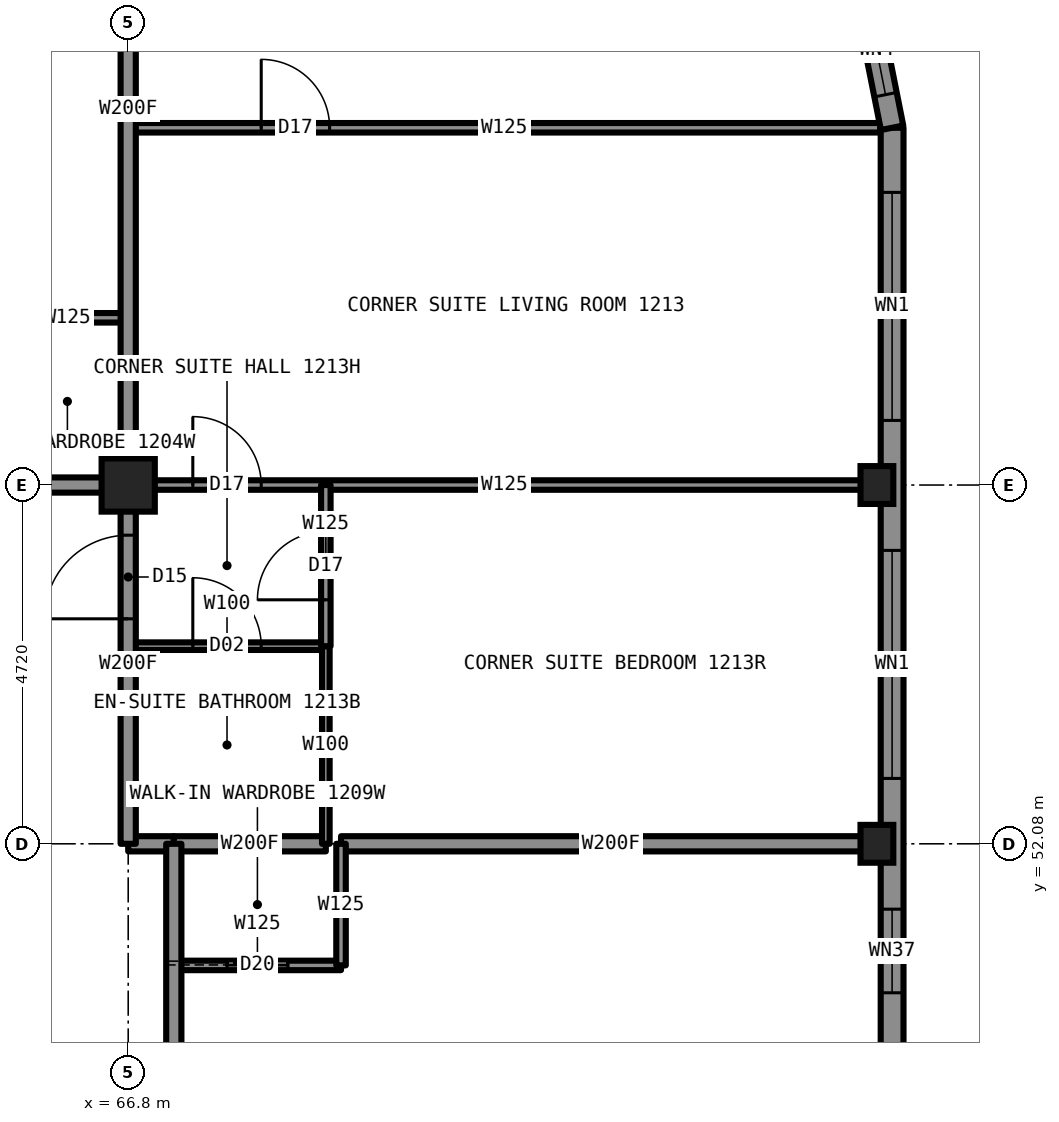
"""IFC4 building model, lengths in metres.
Left out: names, types, materials, properties, quantities, classifications, styles, units other than length and angle.
Written with IfcOpenShell. Run it as: python <this file> out.ifc"""

import sys

from ifc_helpers import new_model, si_unit, direction, frame, frame_2d, origin, origin_2d, place, context, subcontext, project, spatial, rectangle, hollow_rectangle, i_section, extrude, element, fill, save


model = new_model("IFC4")
c1 = context("Model", 3, precision=1e-05, world=origin(), true_north=direction((0.0, 1.0)))
c2 = subcontext(c1, "Body", "Model", "MODEL_VIEW")
j1 = project(units=[si_unit("LENGTHUNIT", "METRE"), si_unit("PLANEANGLEUNIT", "RADIAN")], contexts=[c1])
p1 = place(None, origin())
s1 = spatial("IfcSite", under=j1, at=p1, CompositionType="ELEMENT")
p2 = place(p1, origin())
s2 = spatial("IfcBuilding", under=s1, at=p2, CompositionType="ELEMENT")
p3 = place(p2, frame((0.0, 0.0, 49.5)))
s3 = spatial("IfcBuildingStorey", under=s2, at=p3, CompositionType="ELEMENT", Elevation=49.5)
for number, where, z_axis, x_axis in (
    (1, (76.65, 52.08, 0.0), (0.0, 0.0, 1.0), (1.0, 0.0, 0.0)),
    (2, (76.65, 56.8, 0.0), (0.0, 0.0, 1.0), (1.0, 0.0, 0.0)),
):
    element("IfcColumn", number, at=place(p3, frame(where, z_axis=z_axis, x_axis=x_axis)), inside=s3, PredefinedType="COLUMN", context=c2, shape_type="SweptSolid", body=[
        extrude(i_section(OverallWidth=0.432, OverallDepth=0.498, WebThickness=0.056, FlangeThickness=0.089, at=origin_2d()), origin(), (0.0, 0.0, 1.0), 3.5),
    ])
p4 = place(p3, frame((66.8, 56.8, 0.0), z_axis=(0.0, 0.0, 1.0), x_axis=(1.0, 0.0, 0.0)))
e3 = element("IfcColumn", 3, at=p4, inside=s3, PredefinedType="COLUMN", context=c2, shape_type="SweptSolid", body=[
    extrude(hollow_rectangle(XDim=0.7, YDim=0.7, WallThickness=0.06, at=origin_2d()), origin(), (0.0, 0.0, 1.0), 3.5),
])
p5 = place(p3, frame((43.2, 56.8, 0.0), z_axis=(0.0, 0.0, 1.0), x_axis=(1.0, 0.0, 0.0)))
e4 = element("IfcWall", 4, at=p5, inside=s3, PredefinedType="PARTITIONING", context=c2, shape_type="SweptSolid", body=[
    extrude(rectangle(XDim=23.6, YDim=0.2, at=frame_2d((11.8, 0.0))), origin(), (0.0, 0.0, 1.0), 3.33),
])
p6 = place(p5, frame((1.46, 0.0, 0.0)))
e5 = element("IfcOpeningElement", 5, at=p6, cuts=e4, PredefinedType="OPENING", context=c2, shape_type="SweptSolid", body=[
    extrude(rectangle(XDim=1.0, YDim=2.2, at=frame_2d((0.5, 1.1))), frame((0.0, 0.11, 0.0), z_axis=(0.0, -1.0, 0.0), x_axis=(1.0, 0.0, 0.0)), (0.0, 0.0, 1.0), 0.22),
])
p7 = place(p5, frame((7.27, 0.0, 0.0)))
e6 = element("IfcOpeningElement", 6, at=p7, cuts=e4, PredefinedType="OPENING", context=c2, shape_type="SweptSolid", body=[
    extrude(rectangle(XDim=1.0, YDim=2.2, at=frame_2d((0.5, 1.1))), frame((0.0, 0.11, 0.0), z_axis=(0.0, -1.0, 0.0), x_axis=(1.0, 0.0, 0.0)), (0.0, 0.0, 1.0), 0.22),
])
p8 = place(p5, frame((11.7, 0.0, 0.0)))
e7 = element("IfcOpeningElement", 7, at=p8, cuts=e4, PredefinedType="OPENING", context=c2, shape_type="SweptSolid", body=[
    extrude(rectangle(XDim=1.0, YDim=2.2, at=frame_2d((0.5, 1.1))), frame((0.0, 0.11, 0.0), z_axis=(0.0, -1.0, 0.0), x_axis=(1.0, 0.0, 0.0)), (0.0, 0.0, 1.0), 0.22),
])
p9 = place(p5, frame((17.16, 0.0, 0.0)))
e8 = element("IfcOpeningElement", 8, at=p9, cuts=e4, PredefinedType="OPENING", context=c2, shape_type="SweptSolid", body=[
    extrude(rectangle(XDim=1.0, YDim=2.2, at=frame_2d((0.5, 1.1))), frame((0.0, 0.11, 0.0), z_axis=(0.0, -1.0, 0.0), x_axis=(1.0, 0.0, 0.0)), (0.0, 0.0, 1.0), 0.22),
])
p10 = place(p3, frame((66.8, 56.8, 0.0), z_axis=(0.0, 0.0, 1.0), x_axis=(1.0, 0.0, 0.0)))
e9 = element("IfcWall", 9, at=p10, inside=s3, PredefinedType="PARTITIONING", context=c2, shape_type="SweptSolid", body=[
    extrude(rectangle(XDim=9.9, YDim=0.125, at=frame_2d((4.95, 0.0))), origin(), (0.0, 0.0, 1.0), 2.573),
])
p11 = place(p10, frame((0.85, 0.0, 0.0)))
e10 = element("IfcOpeningElement", 10, at=p11, cuts=e9, PredefinedType="OPENING", context=c2, shape_type="SweptSolid", body=[
    extrude(rectangle(XDim=0.9, YDim=2.2, at=frame_2d((0.45, 1.1))), frame((0.0, 0.073, 0.0), z_axis=(0.0, -1.0, 0.0), x_axis=(1.0, 0.0, 0.0)), (0.0, 0.0, 1.0), 0.145),
])
p12 = place(p3, frame((65.2, 59.0, 0.0), z_axis=(0.0, 0.0, 1.0), x_axis=(1.0, 0.0, 0.0)))
e11 = element("IfcWall", 11, at=p12, inside=s3, PredefinedType="PARTITIONING", context=c2, shape_type="SweptSolid", body=[
    extrude(rectangle(XDim=1.6, YDim=0.125, at=frame_2d((0.8, 0.0))), origin(), (0.0, 0.0, 1.0), 3.33),
])
p13 = place(p3, frame((66.8, 61.5, 0.0), z_axis=(0.0, 0.0, 1.0), x_axis=(1.0, 0.0, 0.0)))
e12 = element("IfcWall", 12, at=p13, inside=s3, PredefinedType="PARTITIONING", context=c2, shape_type="SweptSolid", body=[
    extrude(rectangle(XDim=9.894, YDim=0.125, at=frame_2d((4.947, 0.0))), origin(), (0.0, 0.0, 1.0), 3.33),
])
p14 = place(p13, frame((1.75, 0.0, 0.0)))
e13 = element("IfcOpeningElement", 13, at=p14, cuts=e12, PredefinedType="OPENING", context=c2, shape_type="SweptSolid", body=[
    extrude(rectangle(XDim=0.9, YDim=2.2, at=frame_2d((0.45, 1.1))), frame((0.0, 0.073, 0.0), z_axis=(0.0, -1.0, 0.0), x_axis=(1.0, 0.0, 0.0)), (0.0, 0.0, 1.0), 0.145),
])
p15 = place(p3, frame((67.4, 50.48, 0.0), z_axis=(0.0, 0.0, 1.0), x_axis=(1.0, 0.0, 0.0)))
e14 = element("IfcWall", 14, at=p15, inside=s3, PredefinedType="PARTITIONING", context=c2, shape_type="SweptSolid", body=[
    extrude(rectangle(XDim=2.2, YDim=0.125, at=frame_2d((1.1, 0.0))), origin(), (0.0, 0.0, 1.0), 3.33),
])
p16 = place(p15, frame((0.7, 0.0, 0.0)))
e15 = element("IfcOpeningElement", 15, at=p16, cuts=e14, PredefinedType="OPENING", context=c2, shape_type="SweptSolid", body=[
    extrude(rectangle(XDim=0.8, YDim=2.1, at=frame_2d((0.4, 1.05))), frame((0.0, 0.073, 0.0), z_axis=(0.0, -1.0, 0.0), x_axis=(1.0, 0.0, 0.0)), (0.0, 0.0, 1.0), 0.145),
])
p17 = place(p3, frame((66.8, 52.08, 0.0), z_axis=(0.0, 0.0, 1.0), x_axis=(1.0, 0.0, 0.0)))
e16 = element("IfcWall", 16, at=p17, inside=s3, PredefinedType="PARTITIONING", context=c2, shape_type="SweptSolid", body=[
    extrude(rectangle(XDim=0.6, YDim=0.2, at=frame_2d((0.3, 0.0))), origin(), (0.0, 0.0, 1.0), 2.573),
])
p18 = place(p3, frame((67.4, 52.08, 0.0), z_axis=(0.0, 0.0, 1.0), x_axis=(1.0, 0.0, 0.0)))
e17 = element("IfcWall", 17, at=p18, inside=s3, PredefinedType="PARTITIONING", context=c2, shape_type="SweptSolid", body=[
    extrude(rectangle(XDim=2.0, YDim=0.2, at=frame_2d((1.0, 0.0))), origin(), (0.0, 0.0, 1.0), 2.573),
])
p19 = place(p3, frame((69.6, 52.08, 0.0), z_axis=(0.0, 0.0, 1.0), x_axis=(1.0, 0.0, 0.0)))
e18 = element("IfcWall", 18, at=p19, inside=s3, PredefinedType="PARTITIONING", context=c2, shape_type="SweptSolid", body=[
    extrude(rectangle(XDim=7.1, YDim=0.2, at=frame_2d((3.55, 0.0))), origin(), (0.0, 0.0, 1.0), 2.573),
])
p20 = place(p3, frame((66.8, 54.68, 0.0), z_axis=(0.0, 0.0, 1.0), x_axis=(1.0, 0.0, 0.0)))
e19 = element("IfcWall", 19, at=p20, inside=s3, PredefinedType="PARTITIONING", context=c2, shape_type="SweptSolid", body=[
    extrude(rectangle(XDim=2.6, YDim=0.1, at=frame_2d((1.3, 0.0))), origin(), (0.0, 0.0, 1.0), 3.33),
])
p21 = place(p20, frame((0.85, 0.0, 0.0)))
e20 = element("IfcOpeningElement", 20, at=p21, cuts=e19, PredefinedType="OPENING", context=c2, shape_type="SweptSolid", body=[
    extrude(rectangle(XDim=0.9, YDim=2.1, at=frame_2d((0.45, 1.05))), frame((0.0, 0.06, 0.0), z_axis=(0.0, -1.0, 0.0), x_axis=(1.0, 0.0, 0.0)), (0.0, 0.0, 1.0), 0.12),
])
p22 = place(p3, frame((66.8, 52.08, 0.0), z_axis=(0.0, 0.0, 1.0), x_axis=(0.0, 1.0, 0.0)))
e21 = element("IfcWall", 21, at=p22, inside=s3, PredefinedType="PARTITIONING", context=c2, shape_type="SweptSolid", body=[
    extrude(rectangle(XDim=4.72, YDim=0.2, at=frame_2d((2.36, 0.0))), origin(), (0.0, 0.0, 1.0), 3.33),
])
p23 = place(p22, frame((2.96, 0.0, 0.0)))
e22 = element("IfcOpeningElement", 22, at=p23, cuts=e21, PredefinedType="OPENING", context=c2, shape_type="SweptSolid", body=[
    extrude(rectangle(XDim=1.1, YDim=2.2, at=frame_2d((0.55, 1.1))), frame((0.0, 0.11, 0.0), z_axis=(0.0, -1.0, 0.0), x_axis=(1.0, 0.0, 0.0)), (0.0, 0.0, 1.0), 0.22),
])
p24 = place(p3, frame((66.8, 56.8, 0.0), z_axis=(0.0, 0.0, 1.0), x_axis=(0.0, 1.0, 0.0)))
e23 = element("IfcWall", 23, at=p24, inside=s3, PredefinedType="PARTITIONING", context=c2, shape_type="SweptSolid", body=[
    extrude(rectangle(XDim=9.9, YDim=0.2, at=frame_2d((4.95, 0.0))), origin(), (0.0, 0.0, 1.0), 2.573),
])
p25 = place(p3, frame((67.4, 37.92, 0.0), z_axis=(0.0, 0.0, 1.0), x_axis=(0.0, 1.0, 0.0)))
e24 = element("IfcWall", 24, at=p25, inside=s3, PredefinedType="PARTITIONING", context=c2, shape_type="SweptSolid", body=[
    extrude(rectangle(XDim=14.16, YDim=0.2, at=frame_2d((7.08, 0.0))), origin(), (0.0, 0.0, 1.0), 3.33),
])
p26 = place(p25, frame((3.15, 0.0, 0.0)))
e25 = element("IfcOpeningElement", 25, at=p26, cuts=e24, PredefinedType="OPENING", context=c2, shape_type="SweptSolid", body=[
    extrude(rectangle(XDim=1.0, YDim=2.2, at=frame_2d((0.5, 1.1))), frame((0.0, 0.11, 0.0), z_axis=(0.0, -1.0, 0.0), x_axis=(1.0, 0.0, 0.0)), (0.0, 0.0, 1.0), 0.22),
])
p27 = place(p25, frame((7.72, 0.0, 0.0)))
e26 = element("IfcOpeningElement", 26, at=p27, cuts=e24, PredefinedType="OPENING", context=c2, shape_type="SweptSolid", body=[
    extrude(rectangle(XDim=1.0, YDim=2.2, at=frame_2d((0.5, 1.1))), frame((0.0, 0.11, 0.0), z_axis=(0.0, -1.0, 0.0), x_axis=(1.0, 0.0, 0.0)), (0.0, 0.0, 1.0), 0.22),
])
p28 = place(p3, frame((69.4, 52.08, 0.0), z_axis=(0.0, 0.0, 1.0), x_axis=(0.0, 1.0, 0.0)))
e27 = element("IfcWall", 27, at=p28, inside=s3, PredefinedType="PARTITIONING", context=c2, shape_type="SweptSolid", body=[
    extrude(rectangle(XDim=2.6, YDim=0.1, at=frame_2d((1.3, 0.0))), origin(), (0.0, 0.0, 1.0), 3.33),
])
p29 = place(p3, frame((69.4, 54.68, 0.0), z_axis=(0.0, 0.0, 1.0), x_axis=(0.0, 1.0, 0.0)))
e28 = element("IfcWall", 28, at=p29, inside=s3, PredefinedType="PARTITIONING", context=c2, shape_type="SweptSolid", body=[
    extrude(rectangle(XDim=2.12, YDim=0.125, at=frame_2d((1.06, 0.0))), origin(), (0.0, 0.0, 1.0), 3.33),
])
p30 = place(p29, frame((0.61, 0.0, 0.0)))
e29 = element("IfcOpeningElement", 29, at=p30, cuts=e28, PredefinedType="OPENING", context=c2, shape_type="SweptSolid", body=[
    extrude(rectangle(XDim=0.9, YDim=2.2, at=frame_2d((0.45, 1.1))), frame((0.0, 0.073, 0.0), z_axis=(0.0, -1.0, 0.0), x_axis=(1.0, 0.0, 0.0)), (0.0, 0.0, 1.0), 0.145),
])
p31 = place(p3, frame((69.6, 50.48, 0.0), z_axis=(0.0, 0.0, 1.0), x_axis=(0.0, 1.0, 0.0)))
e30 = element("IfcWall", 30, at=p31, inside=s3, PredefinedType="PARTITIONING", context=c2, shape_type="SweptSolid", body=[
    extrude(rectangle(XDim=1.6, YDim=0.125, at=frame_2d((0.8, 0.0))), origin(), (0.0, 0.0, 1.0), 3.33),
])
p32 = place(p3, frame((76.85, 28.5, 0.0), z_axis=(0.0, 0.0, 1.0), x_axis=(0.0, 1.0, 0.0)))
e31 = element("IfcWall", 31, at=p32, inside=s3, PredefinedType="SOLIDWALL", context=c2, shape_type="SweptSolid", body=[
    extrude(rectangle(XDim=33.0, YDim=0.3, at=frame_2d((16.5, 0.0))), origin(), (0.0, 0.0, 1.0), 2.83),
])
p33 = place(p32, frame((0.85, 0.0, 0.5)))
e32 = element("IfcOpeningElement", 32, at=p33, cuts=e31, PredefinedType="OPENING", context=c2, shape_type="SweptSolid", body=[
    extrude(rectangle(XDim=3.0, YDim=2.0, at=frame_2d((1.5, 1.0))), frame((0.0, 0.16, 0.0), z_axis=(0.0, -1.0, 0.0), x_axis=(1.0, 0.0, 0.0)), (0.0, 0.0, 1.0), 0.32),
])
p34 = place(p32, frame((5.56, 0.0, 0.5)))
e33 = element("IfcOpeningElement", 33, at=p34, cuts=e31, PredefinedType="OPENING", context=c2, shape_type="SweptSolid", body=[
    extrude(rectangle(XDim=3.0, YDim=2.0, at=frame_2d((1.5, 1.0))), frame((0.0, 0.16, 0.0), z_axis=(0.0, -1.0, 0.0), x_axis=(1.0, 0.0, 0.0)), (0.0, 0.0, 1.0), 0.32),
])
p35 = place(p32, frame((10.28, 0.0, 1.1)))
e34 = element("IfcOpeningElement", 34, at=p35, cuts=e31, PredefinedType="OPENING", context=c2, shape_type="SweptSolid", body=[
    extrude(rectangle(XDim=1.1, YDim=1.4, at=frame_2d((0.55, 0.7))), frame((0.0, 0.16, 0.0), z_axis=(0.0, -1.0, 0.0), x_axis=(1.0, 0.0, 0.0)), (0.0, 0.0, 1.0), 0.32),
])
p36 = place(p32, frame((15.0, 0.0, 0.5)))
e35 = element("IfcOpeningElement", 35, at=p36, cuts=e31, PredefinedType="OPENING", context=c2, shape_type="SweptSolid", body=[
    extrude(rectangle(XDim=3.0, YDim=2.0, at=frame_2d((1.5, 1.0))), frame((0.0, 0.16, 0.0), z_axis=(0.0, -1.0, 0.0), x_axis=(1.0, 0.0, 0.0)), (0.0, 0.0, 1.0), 0.32),
])
p37 = place(p32, frame((21.62, 0.0, 1.1)))
e36 = element("IfcOpeningElement", 36, at=p37, cuts=e31, PredefinedType="OPENING", context=c2, shape_type="SweptSolid", body=[
    extrude(rectangle(XDim=1.1, YDim=1.4, at=frame_2d((0.55, 0.7))), frame((0.0, 0.16, 0.0), z_axis=(0.0, -1.0, 0.0), x_axis=(1.0, 0.0, 0.0)), (0.0, 0.0, 1.0), 0.32),
])
p38 = place(p32, frame((24.44, 0.0, 0.5)))
e37 = element("IfcOpeningElement", 37, at=p38, cuts=e31, PredefinedType="OPENING", context=c2, shape_type="SweptSolid", body=[
    extrude(rectangle(XDim=3.0, YDim=2.0, at=frame_2d((1.5, 1.0))), frame((0.0, 0.16, 0.0), z_axis=(0.0, -1.0, 0.0), x_axis=(1.0, 0.0, 0.0)), (0.0, 0.0, 1.0), 0.32),
])
p39 = place(p32, frame((29.15, 0.0, 0.5)))
e38 = element("IfcOpeningElement", 38, at=p39, cuts=e31, PredefinedType="OPENING", context=c2, shape_type="SweptSolid", body=[
    extrude(rectangle(XDim=3.0, YDim=2.0, at=frame_2d((1.5, 1.0))), frame((0.0, 0.16, 0.0), z_axis=(0.0, -1.0, 0.0), x_axis=(1.0, 0.0, 0.0)), (0.0, 0.0, 1.0), 0.32),
])
p40 = place(p3, frame((76.85, 61.5, 0.0), z_axis=(0.0, 0.0, 1.0), x_axis=(-0.195081421501, 0.980787050784, 0.0)))
e39 = element("IfcWall", 39, at=p40, inside=s3, PredefinedType="SOLIDWALL", context=c2, shape_type="SweptSolid", body=[
    extrude(rectangle(XDim=2.087, YDim=0.3, at=frame_2d((1.044, 0.0))), origin(), (0.0, 0.0, 1.0), 3.33),
])
p41 = place(p40, frame((0.444, 0.0, 0.5)))
e40 = element("IfcOpeningElement", 40, at=p41, cuts=e39, PredefinedType="OPENING", context=c2, shape_type="SweptSolid", body=[
    extrude(rectangle(XDim=1.2, YDim=2.0, at=frame_2d((0.6, 1.0))), frame((0.0, 0.16, 0.0), z_axis=(0.0, -1.0, 0.0), x_axis=(1.0, 0.0, 0.0)), (0.0, 0.0, 1.0), 0.32),
])
p42 = place(p16, origin())
e41 = element("IfcDoor", 41, at=p42, inside=s3, OperationType="SLIDING_TO_LEFT", PredefinedType="DOOR", context=c2, shape_type="SweptSolid", body=[
    extrude(rectangle(XDim=0.8, YDim=2.1, at=frame_2d((0.4, 1.05))), frame((0.0, 0.025, 0.0), z_axis=(0.0, -1.0, 0.0), x_axis=(1.0, 0.0, 0.0)), (0.0, 0.0, 1.0), 0.05),
])
fill(e15, e41)
p43 = place(p11, origin())
e42 = element("IfcDoor", 42, at=p43, inside=s3, OperationType="SINGLE_SWING_LEFT", PredefinedType="DOOR", context=c2, shape_type="SweptSolid", body=[
    extrude(rectangle(XDim=0.9, YDim=2.2, at=frame_2d((0.45, 1.1))), frame((0.0, 0.025, 0.0), z_axis=(0.0, -1.0, 0.0), x_axis=(1.0, 0.0, 0.0)), (0.0, 0.0, 1.0), 0.05),
])
fill(e10, e42)
p44 = place(p21, origin())
e43 = element("IfcDoor", 43, at=p44, inside=s3, OperationType="SINGLE_SWING_RIGHT", PredefinedType="DOOR", context=c2, shape_type="SweptSolid", body=[
    extrude(rectangle(XDim=0.9, YDim=2.1, at=frame_2d((0.45, 1.05))), frame((0.0, 0.025, 0.0), z_axis=(0.0, -1.0, 0.0), x_axis=(1.0, 0.0, 0.0)), (0.0, 0.0, 1.0), 0.05),
])
fill(e20, e43)
p45 = place(p23, origin())
e44 = element("IfcDoor", 44, at=p45, inside=s3, OperationType="SINGLE_SWING_LEFT", PredefinedType="DOOR", context=c2, shape_type="SweptSolid", body=[
    extrude(rectangle(XDim=1.1, YDim=2.2, at=frame_2d((0.55, 1.1))), frame((0.0, 0.025, 0.0), z_axis=(0.0, -1.0, 0.0), x_axis=(1.0, 0.0, 0.0)), (0.0, 0.0, 1.0), 0.05),
])
fill(e22, e44)
p46 = place(p14, origin())
e45 = element("IfcDoor", 45, at=p46, inside=s3, OperationType="SINGLE_SWING_LEFT", PredefinedType="DOOR", context=c2, shape_type="SweptSolid", body=[
    extrude(rectangle(XDim=0.9, YDim=2.2, at=frame_2d((0.45, 1.1))), frame((0.0, 0.025, 0.0), z_axis=(0.0, -1.0, 0.0), x_axis=(1.0, 0.0, 0.0)), (0.0, 0.0, 1.0), 0.05),
])
fill(e13, e45)
p47 = place(p30, origin())
e46 = element("IfcDoor", 46, at=p47, inside=s3, OperationType="SINGLE_SWING_LEFT", PredefinedType="DOOR", context=c2, shape_type="SweptSolid", body=[
    extrude(rectangle(XDim=0.9, YDim=2.2, at=frame_2d((0.45, 1.1))), frame((0.0, 0.025, 0.0), z_axis=(0.0, -1.0, 0.0), x_axis=(1.0, 0.0, 0.0)), (0.0, 0.0, 1.0), 0.05),
])
fill(e29, e46)
p48 = place(p37, origin())
e47 = element("IfcWindow", 47, at=p48, inside=s3, PartitioningType="SINGLE_PANEL", PredefinedType="WINDOW", context=c2, shape_type="SweptSolid", body=[
    extrude(rectangle(XDim=1.1, YDim=1.4, at=frame_2d((0.55, 0.7))), frame((0.0, 0.03, 0.0), z_axis=(0.0, -1.0, 0.0), x_axis=(1.0, 0.0, 0.0)), (0.0, 0.0, 1.0), 0.06),
])
fill(e36, e47)
p49 = place(p38, origin())
e48 = element("IfcWindow", 48, at=p49, inside=s3, PartitioningType="SINGLE_PANEL", PredefinedType="WINDOW", context=c2, shape_type="SweptSolid", body=[
    extrude(rectangle(XDim=3.0, YDim=2.0, at=frame_2d((1.5, 1.0))), frame((0.0, 0.03, 0.0), z_axis=(0.0, -1.0, 0.0), x_axis=(1.0, 0.0, 0.0)), (0.0, 0.0, 1.0), 0.06),
])
fill(e37, e48)
p50 = place(p39, origin())
e49 = element("IfcWindow", 49, at=p50, inside=s3, PartitioningType="SINGLE_PANEL", PredefinedType="WINDOW", context=c2, shape_type="SweptSolid", body=[
    extrude(rectangle(XDim=3.0, YDim=2.0, at=frame_2d((1.5, 1.0))), frame((0.0, 0.03, 0.0), z_axis=(0.0, -1.0, 0.0), x_axis=(1.0, 0.0, 0.0)), (0.0, 0.0, 1.0), 0.06),
])
fill(e38, e49)
p51 = place(p41, origin())
e50 = element("IfcWindow", 50, at=p51, inside=s3, PartitioningType="SINGLE_PANEL", PredefinedType="WINDOW", context=c2, shape_type="SweptSolid", body=[
    extrude(rectangle(XDim=1.2, YDim=2.0, at=frame_2d((0.6, 1.0))), frame((0.0, 0.03, 0.0), z_axis=(0.0, -1.0, 0.0), x_axis=(1.0, 0.0, 0.0)), (0.0, 0.0, 1.0), 0.06),
])
fill(e40, e50)
save(model, sys.argv[1])
